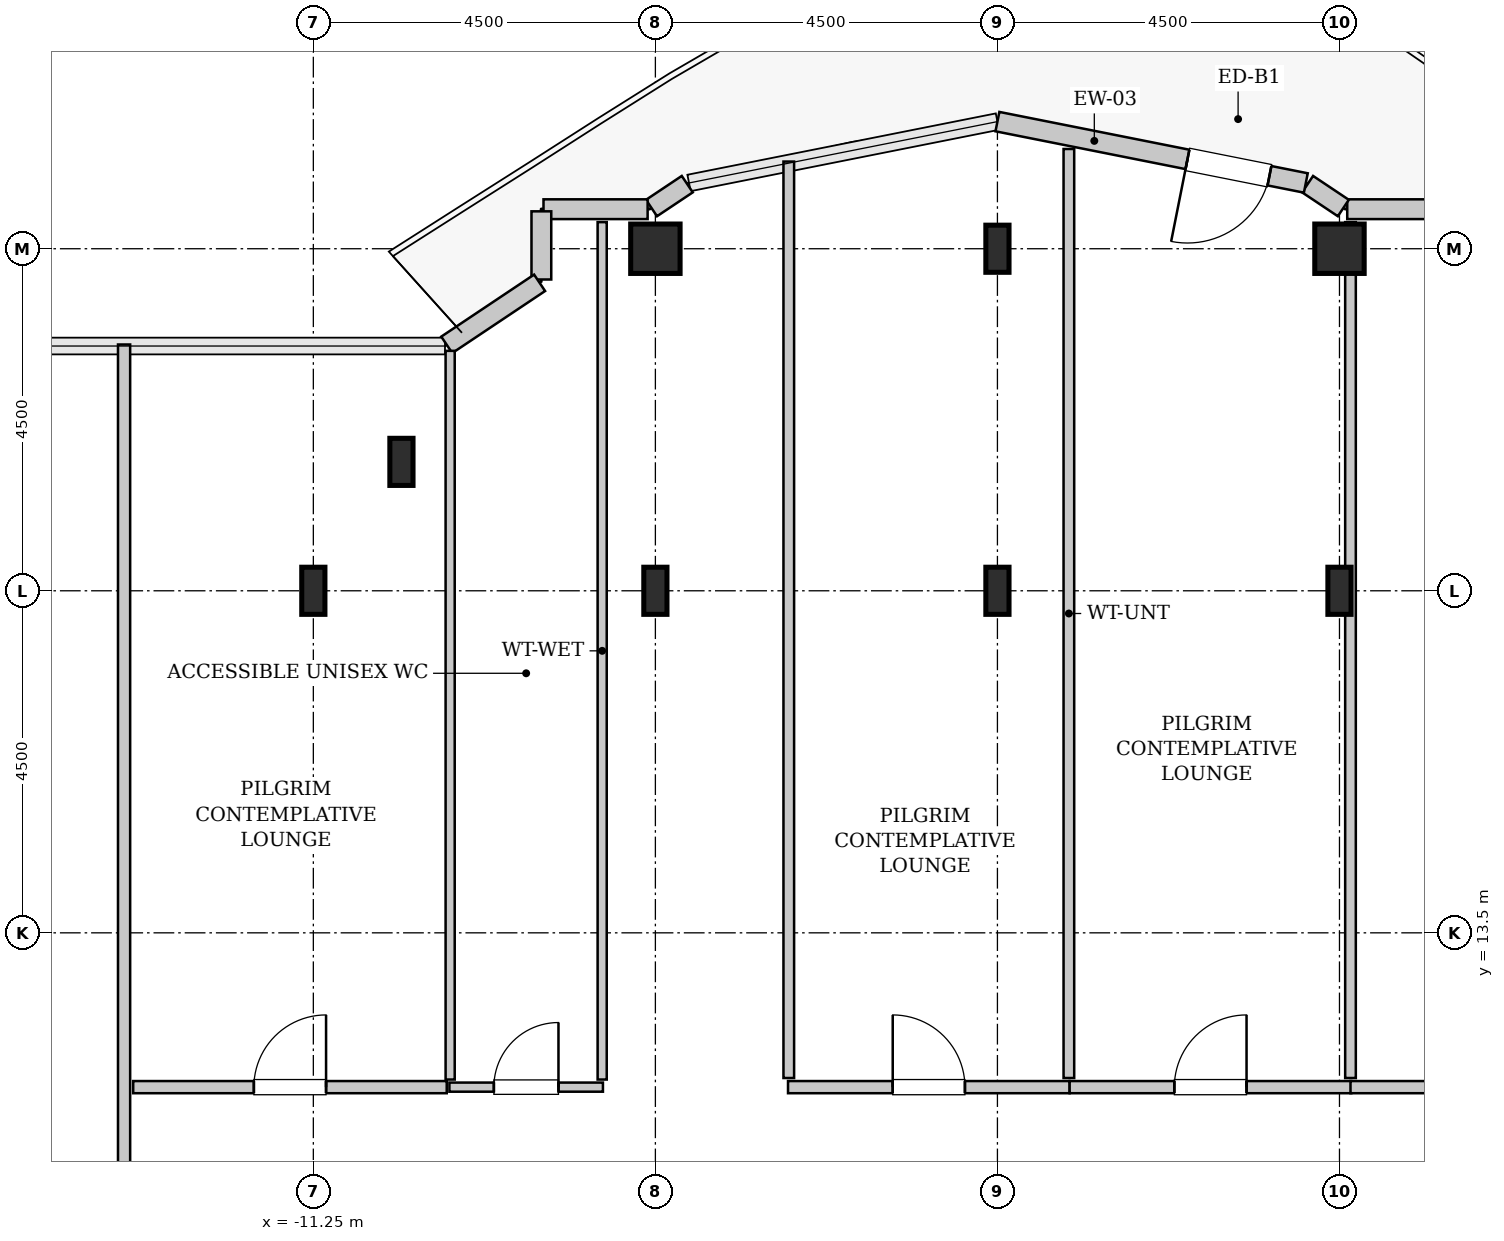
"""IFC4 building model, lengths in metres.
Left out: names, types, materials, properties, quantities, classifications, styles, units other than length and angle.
Written with IfcOpenShell. Run it as: python <this file> out.ifc"""

import sys

from ifc_helpers import new_model, si_unit, direction, frame, frame_2d, origin, origin_2d, place, context, subcontext, project, spatial, rectangle, hollow_rectangle, i_section, extrude, source, transform, mapped, element, fill, save


model = new_model("IFC4")
c1 = context("Model", 3, precision=1e-05, world=origin(), true_north=direction((0.0, 1.0)))
c2 = subcontext(c1, "Body", "Model", "MODEL_VIEW")
j1 = project(units=[si_unit("LENGTHUNIT", "METRE"), si_unit("PLANEANGLEUNIT", "RADIAN")], contexts=[c1])
p1 = place(None, origin())
s1 = spatial("IfcSite", under=j1, at=p1, CompositionType="ELEMENT")
p2 = place(p1, origin())
s2 = spatial("IfcBuilding", under=s1, at=p2, CompositionType="ELEMENT")
p3 = place(p2, frame((0.0, 0.0, 264.6)))
s3 = spatial("IfcBuildingStorey", under=s2, at=p3, CompositionType="ELEMENT", Elevation=264.6)
m1 = source(origin(), c2, "Body", "SweptSolid", [
    extrude(i_section(OverallWidth=0.305, OverallDepth=0.62, WebThickness=0.021, FlangeThickness=0.04, FilletRadius=0.027, at=origin_2d()), origin(), (0.0, 0.0, 1.0), 3.8),
])
for number, where, z_axis, x_axis in (
    (1, (-11.25, 18.0, 0.0), (0.0, 0.0, 1.0), (1.0, 0.0, 0.0)),
    (2, (-10.091, 19.696, 0.0), (0.0, 0.0, 1.0), (1.0, 0.0, 0.0)),
    (3, (-6.75, 18.0, 0.0), (0.0, 0.0, 1.0), (1.0, 0.0, 0.0)),
):
    element("IfcColumn", number, at=place(p3, frame(where, z_axis=z_axis, x_axis=x_axis)), inside=s3, PredefinedType="COLUMN", context=c2, shape_type="MappedRepresentation", body=[
        mapped(m1, transform((0.0, 0.0, 0.0), x_axis=(1.0, 0.0, 0.0), y_axis=(0.0, 1.0, 0.0), z_axis=(0.0, 0.0, 1.0), scale=1.0)),
    ])
m2 = source(origin(), c2, "Body", "SweptSolid", [
    extrude(hollow_rectangle(XDim=0.65, YDim=0.65, WallThickness=0.032, InnerFilletRadius=0.032, OuterFilletRadius=0.064, at=origin_2d()), origin(), (0.0, 0.0, 1.0), 3.8),
])
p4 = place(p3, frame((-6.75, 22.5, 0.0), z_axis=(0.0, 0.0, 1.0), x_axis=(1.0, 0.0, 0.0)))
e4 = element("IfcColumn", 4, at=p4, inside=s3, PredefinedType="COLUMN", context=c2, shape_type="MappedRepresentation", body=[
    mapped(m2, transform((0.0, 0.0, 0.0), x_axis=(1.0, 0.0, 0.0), y_axis=(0.0, 1.0, 0.0), z_axis=(0.0, 0.0, 1.0), scale=1.0)),
])
for number, where, z_axis, x_axis in (
    (5, (-2.25, 18.0, 0.0), (0.0, 0.0, 1.0), (1.0, 0.0, 0.0)),
    (6, (-2.25, 22.5, 0.0), (0.0, 0.0, 1.0), (1.0, 0.0, 0.0)),
    (7, (2.25, 18.0, 0.0), (0.0, 0.0, 1.0), (1.0, 0.0, 0.0)),
):
    element("IfcColumn", number, at=place(p3, frame(where, z_axis=z_axis, x_axis=x_axis)), inside=s3, PredefinedType="COLUMN", context=c2, shape_type="MappedRepresentation", body=[
        mapped(m1, transform((0.0, 0.0, 0.0), x_axis=(1.0, 0.0, 0.0), y_axis=(0.0, 1.0, 0.0), z_axis=(0.0, 0.0, 1.0), scale=1.0)),
    ])
p5 = place(p3, frame((2.25, 22.5, 0.0), z_axis=(0.0, 0.0, 1.0), x_axis=(1.0, 0.0, 0.0)))
e8 = element("IfcColumn", 8, at=p5, inside=s3, PredefinedType="COLUMN", context=c2, shape_type="MappedRepresentation", body=[
    mapped(m2, transform((0.0, 0.0, 0.0), x_axis=(1.0, 0.0, 0.0), y_axis=(0.0, 1.0, 0.0), z_axis=(0.0, 0.0, 1.0), scale=1.0)),
])
m3 = source(origin(), c2, "Body", "SweptSolid", [
    extrude(rectangle(XDim=1.37, YDim=0.26, at=frame_2d((0.685, 0.0))), origin(), (0.0, 0.0, 1.0), 3.55),
])
p6 = place(p3, frame((3.722, 23.02, 0.0), z_axis=(0.0, 0.0, 1.0), x_axis=(-1.0, 0.0, 0.0)))
e9 = element("IfcWall", 9, at=p6, inside=s3, PredefinedType="SOLIDWALL", context=c2, shape_type="MappedRepresentation", body=[
    mapped(m3, transform((0.0, 0.0, 0.0), x_axis=(1.0, 0.0, 0.0), y_axis=(0.0, 1.0, 0.0), z_axis=(0.0, 0.0, 1.0), scale=1.0)),
])
m4 = source(origin(), c2, "Body", "SweptSolid", [
    extrude(rectangle(XDim=0.565, YDim=0.26, at=frame_2d((0.283, 0.0))), origin(), (0.0, 0.0, 1.0), 3.55),
])
p7 = place(p3, frame((2.301, 23.036, 0.0), z_axis=(0.0, 0.0, 1.0), x_axis=(-0.831651492666, 0.555297933317, 0.0)))
e10 = element("IfcWall", 10, at=p7, inside=s3, PredefinedType="SOLIDWALL", context=c2, shape_type="MappedRepresentation", body=[
    mapped(m4, transform((0.0, 0.0, 0.0), x_axis=(1.0, 0.0, 0.0), y_axis=(0.0, 1.0, 0.0), z_axis=(0.0, 0.0, 1.0), scale=1.0)),
])
m5 = source(origin(), c2, "Body", "SweptSolid", [
    extrude(rectangle(XDim=4.137, YDim=0.26, at=frame_2d((2.068, 0.0))), origin(), (0.0, 0.0, 1.0), 3.55),
])
p8 = place(p3, frame((1.807, 23.365, 0.0), z_axis=(0.0, 0.0, 1.0), x_axis=(-0.980782170794, 0.195105954428, 0.0)))
e11 = element("IfcWall", 11, at=p8, inside=s3, PredefinedType="SOLIDWALL", context=c2, shape_type="MappedRepresentation", body=[
    mapped(m5, transform((0.0, 0.0, 0.0), x_axis=(1.0, 0.0, 0.0), y_axis=(0.0, 1.0, 0.0), z_axis=(0.0, 0.0, 1.0), scale=1.0)),
])
p9 = place(p8, frame((0.488, 0.0, 0.0)))
e12 = element("IfcOpeningElement", 12, at=p9, cuts=e11, PredefinedType="OPENING", context=c2, shape_type="SweptSolid", body=[
    extrude(rectangle(XDim=1.1, YDim=2.2, at=frame_2d((0.55, 1.1))), frame((0.0, 0.14, 0.0), z_axis=(0.0, -1.0, 0.0), x_axis=(1.0, 0.0, 0.0)), (0.0, 0.0, 1.0), 0.28),
])
p10 = place(p3, frame((-6.331, 23.35, 0.0), z_axis=(0.0, 0.0, 1.0), x_axis=(-0.831651492666, -0.555297933317, 0.0)))
e13 = element("IfcWall", 13, at=p10, inside=s3, PredefinedType="SOLIDWALL", context=c2, shape_type="MappedRepresentation", body=[
    mapped(m4, transform((0.0, 0.0, 0.0), x_axis=(1.0, 0.0, 0.0), y_axis=(0.0, 1.0, 0.0), z_axis=(0.0, 0.0, 1.0), scale=1.0)),
])
p11 = place(p3, frame((-6.852, 23.02, 0.0), z_axis=(0.0, 0.0, 1.0), x_axis=(-1.0, 0.0, 0.0)))
e14 = element("IfcWall", 14, at=p11, inside=s3, PredefinedType="SOLIDWALL", context=c2, shape_type="MappedRepresentation", body=[
    mapped(m3, transform((0.0, 0.0, 0.0), x_axis=(1.0, 0.0, 0.0), y_axis=(0.0, 1.0, 0.0), z_axis=(0.0, 0.0, 1.0), scale=1.0)),
])
m6 = source(origin(), c2, "Body", "SweptSolid", [
    extrude(rectangle(XDim=0.897, YDim=0.26, at=frame_2d((0.448, 0.0))), origin(), (0.0, 0.0, 1.0), 3.55),
])
p12 = place(p3, frame((-8.25, 22.992, 0.0), z_axis=(0.0, 0.0, 1.0), x_axis=(0.0, -1.0, 0.0)))
e15 = element("IfcWall", 15, at=p12, inside=s3, PredefinedType="SOLIDWALL", context=c2, shape_type="MappedRepresentation", body=[
    mapped(m6, transform((0.0, 0.0, 0.0), x_axis=(1.0, 0.0, 0.0), y_axis=(0.0, 1.0, 0.0), z_axis=(0.0, 0.0, 1.0), scale=1.0)),
])
m7 = source(origin(), c2, "Body", "SweptSolid", [
    extrude(rectangle(XDim=1.469, YDim=0.26, at=frame_2d((0.734, 0.0))), origin(), (0.0, 0.0, 1.0), 3.55),
])
p13 = place(p3, frame((-8.273, 22.052, 0.0), z_axis=(0.0, 0.0, 1.0), x_axis=(-0.831461760506, -0.555581983884, 0.0)))
e16 = element("IfcWall", 16, at=p13, inside=s3, PredefinedType="SOLIDWALL", context=c2, shape_type="MappedRepresentation", body=[
    mapped(m7, transform((0.0, 0.0, 0.0), x_axis=(1.0, 0.0, 0.0), y_axis=(0.0, 1.0, 0.0), z_axis=(0.0, 0.0, 1.0), scale=1.0)),
])
m8 = source(origin(), c2, "Body", "SweptSolid", [
    extrude(rectangle(XDim=2.02, YDim=0.12, at=frame_2d((1.01, 0.0))), origin(), (0.0, 0.0, 1.0), 3.535),
])
p14 = place(p3, frame((-9.46, 11.47, 0.0), z_axis=(0.0, 0.0, 1.0), x_axis=(1.0, 0.0, 0.0)))
e17 = element("IfcWall", 17, at=p14, inside=s3, PredefinedType="PLUMBINGWALL", context=c2, shape_type="MappedRepresentation", body=[
    mapped(m8, transform((0.0, 0.0, 0.0), x_axis=(1.0, 0.0, 0.0), y_axis=(0.0, 1.0, 0.0), z_axis=(0.0, 0.0, 1.0), scale=1.0)),
])
p15 = place(p14, frame((0.585, 0.0, 0.0)))
e18 = element("IfcOpeningElement", 18, at=p15, cuts=e17, PredefinedType="OPENING", context=c2, shape_type="SweptSolid", body=[
    extrude(rectangle(XDim=0.85, YDim=2.1, at=frame_2d((0.425, 1.05))), frame((0.0, 0.07, 0.0), z_axis=(0.0, -1.0, 0.0), x_axis=(1.0, 0.0, 0.0)), (0.0, 0.0, 1.0), 0.14),
])
m9 = source(origin(), c2, "Body", "SweptSolid", [
    extrude(rectangle(XDim=11.28, YDim=0.12, at=frame_2d((5.64, 0.0))), origin(), (0.0, 0.0, 1.0), 3.535),
])
p16 = place(p3, frame((-7.45, 11.57, 0.0), z_axis=(0.0, 0.0, 1.0), x_axis=(0.0, 1.0, 0.0)))
e19 = element("IfcWall", 19, at=p16, inside=s3, PredefinedType="PLUMBINGWALL", context=c2, shape_type="MappedRepresentation", body=[
    mapped(m9, transform((0.0, 0.0, 0.0), x_axis=(1.0, 0.0, 0.0), y_axis=(0.0, 1.0, 0.0), z_axis=(0.0, 0.0, 1.0), scale=1.0)),
])
m10 = source(origin(), c2, "Body", "SweptSolid", [
    extrude(rectangle(XDim=9.587, YDim=0.12, at=frame_2d((4.793, 0.0))), origin(), (0.0, 0.0, 1.0), 3.535),
])
p17 = place(p3, frame((-9.45, 11.57, 0.0), z_axis=(0.0, 0.0, 1.0), x_axis=(0.0, 1.0, 0.0)))
e20 = element("IfcWall", 20, at=p17, inside=s3, PredefinedType="PLUMBINGWALL", context=c2, shape_type="MappedRepresentation", body=[
    mapped(m10, transform((0.0, 0.0, 0.0), x_axis=(1.0, 0.0, 0.0), y_axis=(0.0, 1.0, 0.0), z_axis=(0.0, 0.0, 1.0), scale=1.0)),
])
m11 = source(origin(), c2, "Body", "SweptSolid", [
    extrude(rectangle(XDim=16.045, YDim=0.16, at=frame_2d((8.022, 0.0))), origin(), (0.0, 0.0, 1.0), 3.535),
])
p18 = place(p3, frame((-13.74, 5.195, 0.0), z_axis=(0.0, 0.0, 1.0), x_axis=(0.0, 1.0, 0.0)))
e21 = element("IfcWall", 21, at=p18, inside=s3, PredefinedType="PARTITIONING", context=c2, shape_type="MappedRepresentation", body=[
    mapped(m11, transform((0.0, 0.0, 0.0), x_axis=(1.0, 0.0, 0.0), y_axis=(0.0, 1.0, 0.0), z_axis=(0.0, 0.0, 1.0), scale=1.0)),
])
p19 = place(p18, frame((2.683, 0.0, 0.0)))
e22 = element("IfcOpeningElement", 22, at=p19, cuts=e21, PredefinedType="OPENING", context=c2, shape_type="SweptSolid", body=[
    extrude(rectangle(XDim=0.95, YDim=2.1, at=frame_2d((0.475, 1.05))), frame((0.0, 0.09, 0.0), z_axis=(0.0, -1.0, 0.0), x_axis=(1.0, 0.0, 0.0)), (0.0, 0.0, 1.0), 0.18),
])
m12 = source(origin(), c2, "Body", "SweptSolid", [
    extrude(rectangle(XDim=4.125, YDim=0.16, at=frame_2d((2.062, 0.0))), origin(), (0.0, 0.0, 1.0), 3.535),
])
p20 = place(p3, frame((-13.62, 11.47, 0.0), z_axis=(0.0, 0.0, 1.0), x_axis=(1.0, 0.0, 0.0)))
e23 = element("IfcWall", 23, at=p20, inside=s3, PredefinedType="PARTITIONING", context=c2, shape_type="MappedRepresentation", body=[
    mapped(m12, transform((0.0, 0.0, 0.0), x_axis=(1.0, 0.0, 0.0), y_axis=(0.0, 1.0, 0.0), z_axis=(0.0, 0.0, 1.0), scale=1.0)),
])
p21 = place(p20, frame((1.587, 0.0, 0.0)))
e24 = element("IfcOpeningElement", 24, at=p21, cuts=e23, PredefinedType="OPENING", context=c2, shape_type="SweptSolid", body=[
    extrude(rectangle(XDim=0.95, YDim=2.1, at=frame_2d((0.475, 1.05))), frame((0.0, 0.09, 0.0), z_axis=(0.0, -1.0, 0.0), x_axis=(1.0, 0.0, 0.0)), (0.0, 0.0, 1.0), 0.18),
])
m13 = source(origin(), c2, "Body", "SweptSolid", [
    extrude(rectangle(XDim=3.705, YDim=0.16, at=frame_2d((1.853, 0.0))), origin(), (0.0, 0.0, 1.0), 3.535),
])
p22 = place(p3, frame((-5.005, 11.47, 0.0), z_axis=(0.0, 0.0, 1.0), x_axis=(1.0, 0.0, 0.0)))
e25 = element("IfcWall", 25, at=p22, inside=s3, PredefinedType="PARTITIONING", context=c2, shape_type="MappedRepresentation", body=[
    mapped(m13, transform((0.0, 0.0, 0.0), x_axis=(1.0, 0.0, 0.0), y_axis=(0.0, 1.0, 0.0), z_axis=(0.0, 0.0, 1.0), scale=1.0)),
])
p23 = place(p22, frame((1.377, 0.0, 0.0)))
e26 = element("IfcOpeningElement", 26, at=p23, cuts=e25, PredefinedType="OPENING", context=c2, shape_type="SweptSolid", body=[
    extrude(rectangle(XDim=0.95, YDim=2.1, at=frame_2d((0.475, 1.05))), frame((0.0, 0.09, 0.0), z_axis=(0.0, -1.0, 0.0), x_axis=(1.0, 0.0, 0.0)), (0.0, 0.0, 1.0), 0.18),
])
m14 = source(origin(), c2, "Body", "SweptSolid", [
    extrude(rectangle(XDim=12.222, YDim=0.14, at=frame_2d((6.111, 0.0))), origin(), (0.0, 0.0, 1.0), 3.535),
])
p24 = place(p3, frame((-1.31, 11.59, 0.0), z_axis=(0.0, 0.0, 1.0), x_axis=(0.0, 1.0, 0.0)))
e27 = element("IfcWall", 27, at=p24, inside=s3, PredefinedType="PARTITIONING", context=c2, shape_type="MappedRepresentation", body=[
    mapped(m14, transform((0.0, 0.0, 0.0), x_axis=(1.0, 0.0, 0.0), y_axis=(0.0, 1.0, 0.0), z_axis=(0.0, 0.0, 1.0), scale=1.0)),
])
m15 = source(origin(), c2, "Body", "SweptSolid", [
    extrude(rectangle(XDim=12.057, YDim=0.14, at=frame_2d((6.028, 0.0))), origin(), (0.0, 0.0, 1.0), 3.535),
])
p25 = place(p3, frame((-4.995, 11.59, 0.0), z_axis=(0.0, 0.0, 1.0), x_axis=(0.0, 1.0, 0.0)))
e28 = element("IfcWall", 28, at=p25, inside=s3, PredefinedType="PARTITIONING", context=c2, shape_type="MappedRepresentation", body=[
    mapped(m15, transform((0.0, 0.0, 0.0), x_axis=(1.0, 0.0, 0.0), y_axis=(0.0, 1.0, 0.0), z_axis=(0.0, 0.0, 1.0), scale=1.0)),
])
m16 = source(origin(), c2, "Body", "SweptSolid", [
    extrude(rectangle(XDim=3.705, YDim=0.16, at=frame_2d((1.853, 0.0))), origin(), (0.0, 0.0, 1.0), 3.535),
])
p26 = place(p3, frame((-1.3, 11.47, 0.0), z_axis=(0.0, 0.0, 1.0), x_axis=(1.0, 0.0, 0.0)))
e29 = element("IfcWall", 29, at=p26, inside=s3, PredefinedType="PARTITIONING", context=c2, shape_type="MappedRepresentation", body=[
    mapped(m16, transform((0.0, 0.0, 0.0), x_axis=(1.0, 0.0, 0.0), y_axis=(0.0, 1.0, 0.0), z_axis=(0.0, 0.0, 1.0), scale=1.0)),
])
p27 = place(p26, frame((1.377, 0.0, 0.0)))
e30 = element("IfcOpeningElement", 30, at=p27, cuts=e29, PredefinedType="OPENING", context=c2, shape_type="SweptSolid", body=[
    extrude(rectangle(XDim=0.95, YDim=2.1, at=frame_2d((0.475, 1.05))), frame((0.0, 0.09, 0.0), z_axis=(0.0, -1.0, 0.0), x_axis=(1.0, 0.0, 0.0)), (0.0, 0.0, 1.0), 0.18),
])
m17 = source(origin(), c2, "Body", "SweptSolid", [
    extrude(rectangle(XDim=11.26, YDim=0.14, at=frame_2d((5.63, 0.0))), origin(), (0.0, 0.0, 1.0), 2.925),
])
p28 = place(p3, frame((2.395, 11.59, 0.0), z_axis=(0.0, 0.0, 1.0), x_axis=(0.0, 1.0, 0.0)))
e31 = element("IfcWall", 31, at=p28, inside=s3, PredefinedType="PARTITIONING", context=c2, shape_type="MappedRepresentation", body=[
    mapped(m17, transform((0.0, 0.0, 0.0), x_axis=(1.0, 0.0, 0.0), y_axis=(0.0, 1.0, 0.0), z_axis=(0.0, 0.0, 1.0), scale=1.0)),
])
m18 = source(origin(), c2, "Body", "SweptSolid", [
    extrude(rectangle(XDim=5.81, YDim=0.16, at=frame_2d((2.905, 0.0))), origin(), (0.0, 0.0, 1.0), 3.535),
])
p29 = place(p3, frame((2.395, 11.47, 0.0), z_axis=(0.0, 0.0, 1.0), x_axis=(1.0, 0.0, 0.0)))
e32 = element("IfcWall", 32, at=p29, inside=s3, PredefinedType="PARTITIONING", context=c2, shape_type="MappedRepresentation", body=[
    mapped(m18, transform((0.0, 0.0, 0.0), x_axis=(1.0, 0.0, 0.0), y_axis=(0.0, 1.0, 0.0), z_axis=(0.0, 0.0, 1.0), scale=1.0)),
])
p30 = place(p29, frame((2.43, 0.0, 0.0)))
e33 = element("IfcOpeningElement", 33, at=p30, cuts=e32, PredefinedType="OPENING", context=c2, shape_type="SweptSolid", body=[
    extrude(rectangle(XDim=0.95, YDim=2.1, at=frame_2d((0.475, 1.05))), frame((0.0, 0.09, 0.0), z_axis=(0.0, -1.0, 0.0), x_axis=(1.0, 0.0, 0.0)), (0.0, 0.0, 1.0), 0.18),
])
m19 = source(origin(), c2, "Body", "SweptSolid", [
    extrude(rectangle(XDim=1.1, YDim=2.2, at=frame_2d((0.55, 1.1))), frame((0.0, 0.025, 0.0), z_axis=(0.0, -1.0, 0.0), x_axis=(1.0, 0.0, 0.0)), (0.0, 0.0, 1.0), 0.05),
])
p31 = place(p9, origin())
e34 = element("IfcDoor", 34, at=p31, inside=s3, OperationType="SINGLE_SWING_RIGHT", PredefinedType="DOOR", context=c2, shape_type="MappedRepresentation", body=[
    mapped(m19, transform((0.0, 0.0, 0.0), x_axis=(1.0, 0.0, 0.0), y_axis=(0.0, 1.0, 0.0), z_axis=(0.0, 0.0, 1.0), scale=1.0)),
])
fill(e12, e34)
m20 = source(origin(), c2, "Body", "SweptSolid", [
    extrude(rectangle(XDim=0.85, YDim=2.1, at=frame_2d((0.425, 1.05))), frame((0.0, 0.025, 0.0), z_axis=(0.0, -1.0, 0.0), x_axis=(1.0, 0.0, 0.0)), (0.0, 0.0, 1.0), 0.05),
])
p32 = place(p15, origin())
e35 = element("IfcDoor", 35, at=p32, inside=s3, OperationType="SINGLE_SWING_RIGHT", PredefinedType="DOOR", context=c2, shape_type="MappedRepresentation", body=[
    mapped(m20, transform((0.0, 0.0, 0.0), x_axis=(1.0, 0.0, 0.0), y_axis=(0.0, 1.0, 0.0), z_axis=(0.0, 0.0, 1.0), scale=1.0)),
])
fill(e18, e35)
m21 = source(origin(), c2, "Body", "SweptSolid", [
    extrude(rectangle(XDim=0.95, YDim=2.1, at=frame_2d((0.475, 1.05))), frame((0.0, 0.025, 0.0), z_axis=(0.0, -1.0, 0.0), x_axis=(1.0, 0.0, 0.0)), (0.0, 0.0, 1.0), 0.05),
])
p33 = place(p21, origin())
e36 = element("IfcDoor", 36, at=p33, inside=s3, OperationType="SINGLE_SWING_RIGHT", PredefinedType="DOOR", context=c2, shape_type="MappedRepresentation", body=[
    mapped(m21, transform((0.0, 0.0, 0.0), x_axis=(1.0, 0.0, 0.0), y_axis=(0.0, 1.0, 0.0), z_axis=(0.0, 0.0, 1.0), scale=1.0)),
])
fill(e24, e36)
p34 = place(p23, origin())
e37 = element("IfcDoor", 37, at=p34, inside=s3, OperationType="SINGLE_SWING_LEFT", PredefinedType="DOOR", context=c2, shape_type="MappedRepresentation", body=[
    mapped(m21, transform((0.0, 0.0, 0.0), x_axis=(1.0, 0.0, 0.0), y_axis=(0.0, 1.0, 0.0), z_axis=(0.0, 0.0, 1.0), scale=1.0)),
])
fill(e26, e37)
p35 = place(p27, origin())
e38 = element("IfcDoor", 38, at=p35, inside=s3, OperationType="SINGLE_SWING_RIGHT", PredefinedType="DOOR", context=c2, shape_type="MappedRepresentation", body=[
    mapped(m21, transform((0.0, 0.0, 0.0), x_axis=(1.0, 0.0, 0.0), y_axis=(0.0, 1.0, 0.0), z_axis=(0.0, 0.0, 1.0), scale=1.0)),
])
fill(e30, e38)
save(model, sys.argv[1])
